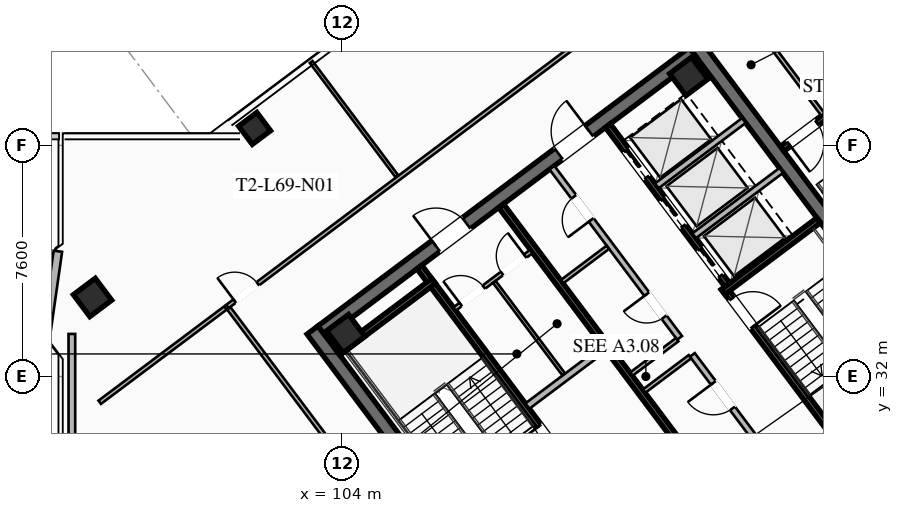
"""IFC4 building model, lengths in metres.
Left out: names, types, materials, properties, quantities, classifications, styles, units other than length and angle.
Written with IfcOpenShell. Run it as: python <this file> out.ifc"""

import sys

from ifc_helpers import new_model, si_unit, direction, frame, frame_2d, origin, origin_2d, place, context, subcontext, project, spatial, rectangle, hollow_rectangle, extrude, element, fill, save


model = new_model("IFC4")
c1 = context("Model", 3, precision=1e-05, world=origin(), true_north=direction((0.0, 1.0)))
c2 = subcontext(c1, "Body", "Model", "MODEL_VIEW")
j1 = project(units=[si_unit("LENGTHUNIT", "METRE"), si_unit("PLANEANGLEUNIT", "RADIAN")], contexts=[c1])
p1 = place(None, origin())
s1 = spatial("IfcSite", under=j1, at=p1, CompositionType="ELEMENT")
p2 = place(p1, origin())
s2 = spatial("IfcBuilding", under=s1, at=p2, CompositionType="ELEMENT")
p3 = place(p2, frame((0.0, 0.0, 255.4)))
s3 = spatial("IfcBuildingStorey", under=s2, at=p3, CompositionType="ELEMENT", Elevation=255.4)
for number, where, z_axis, x_axis in (
    (1, (112.396, 21.047, 0.0), (0.0, 0.0, 1.0), (-0.6, 0.8, 0.0)),
    (2, (115.604, 42.953, 0.0), (0.0, 0.0, 1.0), (0.6, -0.8, 0.0)),
):
    element("IfcWall", number, at=place(p3, frame(where, z_axis=z_axis, x_axis=x_axis)), inside=s3, PredefinedType="SHEAR", context=c2, shape_type="SweptSolid", body=[
        extrude(rectangle(XDim=15.6, YDim=0.45, at=frame_2d((7.8, 0.0))), origin(), (0.0, 0.0, 1.0), 4.0),
    ])
p4 = place(p3, frame((124.649, 30.518, 0.0), z_axis=(0.0, 0.0, 1.0), x_axis=(-0.8, -0.6, 0.0)))
e3 = element("IfcWall", 3, at=p4, inside=s3, PredefinedType="SHEAR", context=c2, shape_type="SweptSolid", body=[
    extrude(rectangle(XDim=15.26, YDim=0.45, at=frame_2d((7.63, 0.0))), origin(), (0.0, 0.0, 1.0), 4.0),
])
p5 = place(p4, frame((9.33, 0.0, 0.0)))
e4 = element("IfcOpeningElement", 4, at=p5, cuts=e3, PredefinedType="OPENING", context=c2, shape_type="SweptSolid", body=[
    extrude(rectangle(XDim=1.25, YDim=2.25, at=frame_2d((0.625, 1.125))), frame((0.0, 0.235, 0.0), z_axis=(0.0, -1.0, 0.0), x_axis=(1.0, 0.0, 0.0)), (0.0, 0.0, 1.0), 0.47),
])
p6 = place(p4, frame((4.28, 0.0, 0.0)))
e5 = element("IfcOpeningElement", 5, at=p6, cuts=e3, PredefinedType="OPENING", context=c2, shape_type="SweptSolid", body=[
    extrude(rectangle(XDim=1.25, YDim=2.25, at=frame_2d((0.625, 1.125))), frame((0.0, 0.235, 0.0), z_axis=(0.0, -1.0, 0.0), x_axis=(1.0, 0.0, 0.0)), (0.0, 0.0, 1.0), 0.47),
])
p7 = place(p3, frame((103.351, 33.482, 0.0), z_axis=(0.0, 0.0, 1.0), x_axis=(0.8, 0.6, 0.0)))
e6 = element("IfcWall", 6, at=p7, inside=s3, PredefinedType="SHEAR", context=c2, shape_type="SweptSolid", body=[
    extrude(rectangle(XDim=15.26, YDim=0.45, at=frame_2d((7.63, 0.0))), origin(), (0.0, 0.0, 1.0), 4.0),
])
p8 = place(p7, frame((4.68, 0.0, 0.0)))
e7 = element("IfcOpeningElement", 7, at=p8, cuts=e6, PredefinedType="OPENING", context=c2, shape_type="SweptSolid", body=[
    extrude(rectangle(XDim=1.25, YDim=2.25, at=frame_2d((0.625, 1.125))), frame((0.0, 0.235, 0.0), z_axis=(0.0, -1.0, 0.0), x_axis=(1.0, 0.0, 0.0)), (0.0, 0.0, 1.0), 0.47),
])
p9 = place(p7, frame((9.73, 0.0, 0.0)))
e8 = element("IfcOpeningElement", 8, at=p9, cuts=e6, PredefinedType="OPENING", context=c2, shape_type="SweptSolid", body=[
    extrude(rectangle(XDim=1.25, YDim=2.25, at=frame_2d((0.625, 1.125))), frame((0.0, 0.235, 0.0), z_axis=(0.0, -1.0, 0.0), x_axis=(1.0, 0.0, 0.0)), (0.0, 0.0, 1.0), 0.47),
])
for number, where, z_axis, x_axis in (
    (9, (115.41, 41.87, 0.0), (0.0, 0.0, 1.0), (0.8, 0.6, 0.0)),
    (10, (104.13, 33.41, 0.0), (0.0, 0.0, 1.0), (0.8, 0.6, 0.0)),
    (11, (95.8, 34.6, 0.0), (0.0, 0.0, 1.0), (0.8, 0.6, 0.0)),
):
    element("IfcColumn", number, at=place(p3, frame(where, z_axis=z_axis, x_axis=x_axis)), inside=s3, PredefinedType="COLUMN", context=c2, shape_type="SweptSolid", body=[
        extrude(hollow_rectangle(XDim=0.9, YDim=0.9, WallThickness=0.04, at=origin_2d()), origin(), (0.0, 0.0, 1.0), 3.78),
    ])
p10 = place(p3, frame((101.13, 40.16, 0.0), z_axis=(0.0, 0.0, 1.0), x_axis=(0.799999996291, 0.600000004945, 0.0)))
e12 = element("IfcColumn", 12, at=p10, inside=s3, PredefinedType="COLUMN", context=c2, shape_type="SweptSolid", body=[
    extrude(hollow_rectangle(XDim=0.75, YDim=0.75, WallThickness=0.032, at=origin_2d()), origin(), (0.0, 0.0, 1.0), 3.78),
])
p11 = place(p3, frame((94.28, 33.46, 0.0), z_axis=(0.0, 0.0, 1.0), x_axis=(0.141370477216, 0.989956760759, 0.0)))
e13 = element("IfcWall", 13, at=p11, inside=s3, PredefinedType="SOLIDWALL", context=c2, shape_type="SweptSolid", body=[
    extrude(rectangle(XDim=2.687, YDim=0.28, at=frame_2d((1.344, 0.0))), origin(), (0.0, 0.0, 1.0), 2.96),
])
p12 = place(p3, frame((95.12, 24.22, 0.0), z_axis=(0.0, 0.0, 1.0), x_axis=(0.0, 1.0, 0.0)))
e14 = element("IfcWall", 14, at=p12, inside=s3, PredefinedType="SOLIDWALL", context=c2, shape_type="SweptSolid", body=[
    extrude(rectangle(XDim=9.18, YDim=0.22, at=frame_2d((4.59, 0.0))), origin(), (0.0, 0.0, 1.0), 2.971),
])
p13 = place(p12, frame((4.2, 0.0, 0.0)))
e15 = element("IfcOpeningElement", 15, at=p13, cuts=e14, PredefinedType="OPENING", context=c2, shape_type="SweptSolid", body=[
    extrude(rectangle(XDim=1.25, YDim=2.25, at=frame_2d((0.625, 1.125))), frame((0.0, 0.12, 0.0), z_axis=(0.0, -1.0, 0.0), x_axis=(1.0, 0.0, 0.0)), (0.0, 0.0, 1.0), 0.24),
])
p14 = place(p3, frame((111.44, 29.08, 0.0), z_axis=(0.0, 0.0, 1.0), x_axis=(-0.59999041401, 0.800007189403, 0.0)))
e16 = element("IfcWall", 16, at=p14, inside=s3, PredefinedType="SHEAR", context=c2, shape_type="SweptSolid", body=[
    extrude(rectangle(XDim=8.15, YDim=0.2, at=frame_2d((4.075, 0.0))), origin(), (0.0, 0.0, 1.0), 3.78),
])
p15 = place(p14, frame((0.45, 0.0, 0.0)))
e17 = element("IfcOpeningElement", 17, at=p15, cuts=e16, PredefinedType="OPENING", context=c2, shape_type="SweptSolid", body=[
    extrude(rectangle(XDim=1.15, YDim=2.2, at=frame_2d((0.575, 1.1))), frame((0.0, 0.11, 0.0), z_axis=(0.0, -1.0, 0.0), x_axis=(1.0, 0.0, 0.0)), (0.0, 0.0, 1.0), 0.22),
])
p16 = place(p3, frame((103.876, 32.782, 0.0), z_axis=(0.0, 0.0, 1.0), x_axis=(0.800014909178, 0.599980120581, 0.0)))
e18 = element("IfcWall", 18, at=p16, inside=s3, PredefinedType="SHEAR", context=c2, shape_type="SweptSolid", body=[
    extrude(rectangle(XDim=3.93, YDim=0.2, at=frame_2d((1.965, 0.0))), origin(), (0.0, 0.0, 1.0), 3.78),
])
p17 = place(p3, frame((116.56, 34.92, 0.0), z_axis=(0.0, 0.0, 1.0), x_axis=(0.59999041401, -0.800007189403, 0.0)))
e19 = element("IfcWall", 19, at=p17, inside=s3, PredefinedType="SHEAR", context=c2, shape_type="SweptSolid", body=[
    extrude(rectangle(XDim=8.15, YDim=0.2, at=frame_2d((4.075, 0.0))), origin(), (0.0, 0.0, 1.0), 3.78),
])
p18 = place(p17, frame((0.45, 0.0, 0.0)))
e20 = element("IfcOpeningElement", 20, at=p18, cuts=e19, PredefinedType="OPENING", context=c2, shape_type="SweptSolid", body=[
    extrude(rectangle(XDim=1.15, YDim=2.2, at=frame_2d((0.575, 1.1))), frame((0.0, 0.11, 0.0), z_axis=(0.0, -1.0, 0.0), x_axis=(1.0, 0.0, 0.0)), (0.0, 0.0, 1.0), 0.22),
])
p19 = place(p3, frame((116.54, 34.78, 0.0), z_axis=(0.0, 0.0, 1.0), x_axis=(0.800014909178, 0.599980120581, 0.0)))
e21 = element("IfcWall", 21, at=p19, inside=s3, PredefinedType="SHEAR", context=c2, shape_type="SweptSolid", body=[
    extrude(rectangle(XDim=3.93, YDim=0.2, at=frame_2d((1.965, 0.0))), origin(), (0.0, 0.0, 1.0), 3.78),
])
p20 = place(p3, frame((118.058, 25.856, 0.0), z_axis=(0.0, 0.0, 1.0), x_axis=(-0.600002657301, 0.799998007018, 0.0)))
e22 = element("IfcWall", 22, at=p20, inside=s3, PredefinedType="SHEAR", context=c2, shape_type="SweptSolid", body=[
    extrude(rectangle(XDim=14.7, YDim=0.2, at=frame_2d((7.35, 0.0))), origin(), (0.0, 0.0, 1.0), 3.78),
])
p21 = place(p3, frame((110.104, 31.028, 0.0), z_axis=(0.0, 0.0, 1.0), x_axis=(0.800018601094, 0.59997519774, 0.0)))
e23 = element("IfcWall", 23, at=p21, inside=s3, PredefinedType="SOLIDWALL", context=c2, shape_type="SweptSolid", body=[
    extrude(rectangle(XDim=3.15, YDim=0.22, at=frame_2d((1.575, 0.0))), origin(), (0.0, 0.0, 1.0), 2.971),
])
p22 = place(p3, frame((112.75, 40.25, 0.0), z_axis=(0.0, 0.0, 1.0), x_axis=(0.599994036198, -0.800004472816, 0.0)))
e24 = element("IfcWall", 24, at=p22, inside=s3, PredefinedType="SHEAR", context=c2, shape_type="SweptSolid", body=[
    extrude(rectangle(XDim=6.55, YDim=0.2, at=frame_2d((3.275, 0.0))), origin(), (0.0, 0.0, 1.0), 3.78),
])
p23 = place(p22, frame((5.075, 0.0, 0.0)))
e25 = element("IfcOpeningElement", 25, at=p23, cuts=e24, PredefinedType="OPENING", context=c2, shape_type="SweptSolid", body=[
    extrude(rectangle(XDim=1.1, YDim=2.2, at=frame_2d((0.55, 1.1))), frame((0.0, 0.11, 0.0), z_axis=(0.0, -1.0, 0.0), x_axis=(1.0, 0.0, 0.0)), (0.0, 0.0, 1.0), 0.22),
])
p24 = place(p22, frame((3.025, 0.0, 0.0)))
e26 = element("IfcOpeningElement", 26, at=p24, cuts=e24, PredefinedType="OPENING", context=c2, shape_type="SweptSolid", body=[
    extrude(rectangle(XDim=1.1, YDim=2.2, at=frame_2d((0.55, 1.1))), frame((0.0, 0.11, 0.0), z_axis=(0.0, -1.0, 0.0), x_axis=(1.0, 0.0, 0.0)), (0.0, 0.0, 1.0), 0.22),
])
p25 = place(p22, frame((1.025, 0.0, 0.0)))
e27 = element("IfcOpeningElement", 27, at=p25, cuts=e24, PredefinedType="OPENING", context=c2, shape_type="SweptSolid", body=[
    extrude(rectangle(XDim=1.1, YDim=2.2, at=frame_2d((0.55, 1.1))), frame((0.0, 0.11, 0.0), z_axis=(0.0, -1.0, 0.0), x_axis=(1.0, 0.0, 0.0)), (0.0, 0.0, 1.0), 0.22),
])
for number, where, z_axis, x_axis in (
    (28, (115.59, 36.63, 0.0), (0.0, 0.0, 1.0), (0.8, 0.6, 0.0)),
    (29, (114.36, 38.27, 0.0), (0.0, 0.0, 1.0), (0.8, 0.6, 0.0)),
):
    element("IfcWall", number, at=place(p3, frame(where, z_axis=z_axis, x_axis=x_axis)), inside=s3, PredefinedType="SOLIDWALL", context=c2, shape_type="SweptSolid", body=[
        extrude(rectangle(XDim=3.58, YDim=0.2, at=frame_2d((1.79, 0.0))), origin(), (0.0, 0.0, 1.0), 3.78),
    ])
p26 = place(p3, frame((107.71, 34.22, 0.0), z_axis=(0.0, 0.0, 1.0), x_axis=(0.799981399002, 0.60002480053, 0.0)))
e30 = element("IfcWall", 30, at=p26, inside=s3, PredefinedType="PARTITIONING", context=c2, shape_type="SweptSolid", body=[
    extrude(rectangle(XDim=3.15, YDim=0.135, at=frame_2d((1.575, 0.0))), origin(), (0.0, 0.0, 1.0), 2.971),
])
p27 = place(p26, frame((0.25, 0.0, 0.0)))
e31 = element("IfcOpeningElement", 31, at=p27, cuts=e30, PredefinedType="OPENING", context=c2, shape_type="SweptSolid", body=[
    extrude(rectangle(XDim=0.95, YDim=2.05, at=frame_2d((0.475, 1.025))), frame((0.0, 0.077, 0.0), z_axis=(0.0, -1.0, 0.0), x_axis=(1.0, 0.0, 0.0)), (0.0, 0.0, 1.0), 0.155),
])
p28 = place(p26, frame((1.95, 0.0, 0.0)))
e32 = element("IfcOpeningElement", 32, at=p28, cuts=e30, PredefinedType="OPENING", context=c2, shape_type="SweptSolid", body=[
    extrude(rectangle(XDim=0.95, YDim=2.05, at=frame_2d((0.475, 1.025))), frame((0.0, 0.077, 0.0), z_axis=(0.0, -1.0, 0.0), x_axis=(1.0, 0.0, 0.0)), (0.0, 0.0, 1.0), 0.155),
])
p29 = place(p3, frame((111.296, 32.072, 0.0), z_axis=(0.0, 0.0, 1.0), x_axis=(-0.59995887973, 0.800030838552, 0.0)))
e33 = element("IfcWall", 33, at=p29, inside=s3, PredefinedType="PARTITIONING", context=c2, shape_type="SweptSolid", body=[
    extrude(rectangle(XDim=3.8, YDim=0.11, at=frame_2d((1.9, 0.0))), origin(), (0.0, 0.0, 1.0), 2.971),
])
p30 = place(p3, frame((119.73, 27.11, 0.0), z_axis=(0.0, 0.0, 1.0), x_axis=(-0.600005580459, 0.799995814625, 0.0)))
e34 = element("IfcWall", 34, at=p30, inside=s3, PredefinedType="SOLIDWALL", context=c2, shape_type="SweptSolid", body=[
    extrude(rectangle(XDim=7.0, YDim=0.2, at=frame_2d((3.5, 0.0))), origin(), (0.0, 0.0, 1.0), 2.971),
])
p31 = place(p30, frame((0.85, 0.0, 0.0)))
e35 = element("IfcOpeningElement", 35, at=p31, cuts=e34, PredefinedType="OPENING", context=c2, shape_type="SweptSolid", body=[
    extrude(rectangle(XDim=0.95, YDim=2.05, at=frame_2d((0.475, 1.025))), frame((0.0, 0.11, 0.0), z_axis=(0.0, -1.0, 0.0), x_axis=(1.0, 0.0, 0.0)), (0.0, 0.0, 1.0), 0.22),
])
p32 = place(p30, frame((4.8, 0.0, 0.0)))
e36 = element("IfcOpeningElement", 36, at=p32, cuts=e34, PredefinedType="OPENING", context=c2, shape_type="SweptSolid", body=[
    extrude(rectangle(XDim=1.05, YDim=2.2, at=frame_2d((0.525, 1.1))), frame((0.0, 0.11, 0.0), z_axis=(0.0, -1.0, 0.0), x_axis=(1.0, 0.0, 0.0)), (0.0, 0.0, 1.0), 0.22),
])
p33 = place(p3, frame((113.946, 31.522, 0.0), z_axis=(0.0, 0.0, 1.0), x_axis=(0.8, 0.6, 0.0)))
e37 = element("IfcWall", 37, at=p33, inside=s3, PredefinedType="PARTITIONING", context=c2, shape_type="SweptSolid", body=[
    extrude(rectangle(XDim=1.88, YDim=0.135, at=frame_2d((0.94, 0.0))), origin(), (0.0, 0.0, 1.0), 2.971),
])
p34 = place(p3, frame((115.11, 33.27, 0.0), z_axis=(0.0, 0.0, 1.0), x_axis=(-0.600011160345, 0.79999162962, 0.0)))
e38 = element("IfcWall", 38, at=p34, inside=s3, PredefinedType="SOLIDWALL", context=c2, shape_type="SweptSolid", body=[
    extrude(rectangle(XDim=7.0, YDim=0.2, at=frame_2d((3.5, 0.0))), origin(), (0.0, 0.0, 1.0), 2.971),
])
p35 = place(p34, frame((0.85, 0.0, 0.0)))
e39 = element("IfcOpeningElement", 39, at=p35, cuts=e38, PredefinedType="OPENING", context=c2, shape_type="SweptSolid", body=[
    extrude(rectangle(XDim=0.95, YDim=2.05, at=frame_2d((0.475, 1.025))), frame((0.0, 0.11, 0.0), z_axis=(0.0, -1.0, 0.0), x_axis=(1.0, 0.0, 0.0)), (0.0, 0.0, 1.0), 0.22),
])
p36 = place(p34, frame((4.85, 0.0, 0.0)))
e40 = element("IfcOpeningElement", 40, at=p36, cuts=e38, PredefinedType="OPENING", context=c2, shape_type="SweptSolid", body=[
    extrude(rectangle(XDim=0.95, YDim=2.05, at=frame_2d((0.475, 1.025))), frame((0.0, 0.11, 0.0), z_axis=(0.0, -1.0, 0.0), x_axis=(1.0, 0.0, 0.0)), (0.0, 0.0, 1.0), 0.22),
])
p37 = place(p3, frame((113.526, 32.082, 0.0), z_axis=(0.0, 0.0, 1.0), x_axis=(0.800046745961, 0.599937666993, 0.0)))
e41 = element("IfcWall", 41, at=p37, inside=s3, PredefinedType="PARTITIONING", context=c2, shape_type="SweptSolid", body=[
    extrude(rectangle(XDim=1.88, YDim=0.135, at=frame_2d((0.94, 0.0))), origin(), (0.0, 0.0, 1.0), 2.971),
])
p38 = place(p3, frame((111.246, 35.122, 0.0), z_axis=(0.0, 0.0, 1.0), x_axis=(0.8, 0.6, 0.0)))
e42 = element("IfcWall", 42, at=p38, inside=s3, PredefinedType="PARTITIONING", context=c2, shape_type="SweptSolid", body=[
    extrude(rectangle(XDim=1.88, YDim=0.135, at=frame_2d((0.94, 0.0))), origin(), (0.0, 0.0, 1.0), 2.971),
])
p39 = place(p3, frame((121.204, 41.528, 0.0), z_axis=(0.0, 0.0, 1.0), x_axis=(-0.800017232136, -0.599977023131, 0.0)))
e43 = element("IfcWall", 43, at=p39, inside=s3, PredefinedType="SHEAR", context=c2, shape_type="SweptSolid", body=[
    extrude(rectangle(XDim=3.4, YDim=0.2, at=frame_2d((1.7, 0.0))), origin(), (0.0, 0.0, 1.0), 3.78),
])
p40 = place(p39, frame((1.975, 0.0, 0.0)))
e44 = element("IfcOpeningElement", 44, at=p40, cuts=e43, PredefinedType="OPENING", context=c2, shape_type="SweptSolid", body=[
    extrude(rectangle(XDim=1.15, YDim=2.2, at=frame_2d((0.575, 1.1))), frame((0.0, 0.11, 0.0), z_axis=(0.0, -1.0, 0.0), x_axis=(1.0, 0.0, 0.0)), (0.0, 0.0, 1.0), 0.22),
])
p41 = place(p3, frame((119.824, 40.618, 0.0), z_axis=(0.0, 0.0, 1.0), x_axis=(-0.599982243973, 0.800013316712, 0.0)))
e45 = element("IfcWall", 45, at=p41, inside=s3, PredefinedType="PARTITIONING", context=c2, shape_type="SweptSolid", body=[
    extrude(rectangle(XDim=4.4, YDim=0.135, at=frame_2d((2.2, 0.0))), origin(), (0.0, 0.0, 1.0), 2.971),
])
p42 = place(p3, frame((100.236, 34.302, 0.0), z_axis=(0.0, 0.0, 1.0), x_axis=(0.799997393501, 0.600003475316, 0.0)))
e46 = element("IfcWall", 46, at=p42, inside=s3, PredefinedType="PARTITIONING", context=c2, shape_type="SweptSolid", body=[
    extrude(rectangle(XDim=22.48, YDim=0.135, at=frame_2d((11.24, 0.0))), origin(), (0.0, 0.0, 1.0), 2.971),
])
p43 = place(p42, frame((0.3, 0.0, 0.0)))
e47 = element("IfcOpeningElement", 47, at=p43, cuts=e46, PredefinedType="OPENING", context=c2, shape_type="SweptSolid", body=[
    extrude(rectangle(XDim=0.95, YDim=2.05, at=frame_2d((0.475, 1.025))), frame((0.0, 0.077, 0.0), z_axis=(0.0, -1.0, 0.0), x_axis=(1.0, 0.0, 0.0)), (0.0, 0.0, 1.0), 0.155),
])
p44 = place(p42, frame((21.23, 0.0, 0.0)))
e48 = element("IfcOpeningElement", 48, at=p44, cuts=e46, PredefinedType="OPENING", context=c2, shape_type="SweptSolid", body=[
    extrude(rectangle(XDim=0.95, YDim=2.05, at=frame_2d((0.475, 1.025))), frame((0.0, 0.077, 0.0), z_axis=(0.0, -1.0, 0.0), x_axis=(1.0, 0.0, 0.0)), (0.0, 0.0, 1.0), 0.155),
])
p45 = place(p3, frame((105.812, 38.584, 0.0), z_axis=(0.0, 0.0, 1.0), x_axis=(-0.600008311051, 0.799993766644, 0.0)))
e49 = element("IfcWall", 49, at=p45, inside=s3, PredefinedType="PARTITIONING", context=c2, shape_type="SweptSolid", body=[
    extrude(rectangle(XDim=4.7, YDim=0.11, at=frame_2d((2.35, 0.0))), origin(), (0.0, 0.0, 1.0), 2.971),
])
p46 = place(p3, frame((111.99, 18.63, 0.0), z_axis=(0.0, 0.0, 1.0), x_axis=(-0.599997997836, 0.800001501619, 0.0)))
e50 = element("IfcWall", 50, at=p46, inside=s3, PredefinedType="PARTITIONING", context=c2, shape_type="SweptSolid", body=[
    extrude(rectangle(XDim=19.51, YDim=0.135, at=frame_2d((9.755, 0.0))), origin(), (0.0, 0.0, 1.0), 2.971),
])
p47 = place(p46, frame((0.3, 0.0, 0.0)))
e51 = element("IfcOpeningElement", 51, at=p47, cuts=e50, PredefinedType="OPENING", context=c2, shape_type="SweptSolid", body=[
    extrude(rectangle(XDim=0.95, YDim=2.05, at=frame_2d((0.475, 1.025))), frame((0.0, 0.077, 0.0), z_axis=(0.0, -1.0, 0.0), x_axis=(1.0, 0.0, 0.0)), (0.0, 0.0, 1.0), 0.155),
])
p48 = place(p46, frame((9.232, 0.0, 0.0)))
e52 = element("IfcOpeningElement", 52, at=p48, cuts=e50, PredefinedType="OPENING", context=c2, shape_type="SweptSolid", body=[
    extrude(rectangle(XDim=0.95, YDim=2.05, at=frame_2d((0.475, 1.025))), frame((0.0, 0.077, 0.0), z_axis=(0.0, -1.0, 0.0), x_axis=(1.0, 0.0, 0.0)), (0.0, 0.0, 1.0), 0.155),
])
p49 = place(p3, frame((100.172, 34.254, 0.0), z_axis=(0.0, 0.0, 1.0), x_axis=(-0.800033998508, -0.59995466598, 0.0)))
e53 = element("IfcWall", 53, at=p49, inside=s3, PredefinedType="PARTITIONING", context=c2, shape_type="SweptSolid", body=[
    extrude(rectangle(XDim=5.17, YDim=0.135, at=frame_2d((2.585, 0.0))), origin(), (0.0, 0.0, 1.0), 2.971),
])
p50 = place(p8, origin())
e54 = element("IfcDoor", 54, at=p50, inside=s3, OperationType="SINGLE_SWING_LEFT", PredefinedType="DOOR", context=c2, shape_type="SweptSolid", body=[
    extrude(rectangle(XDim=1.25, YDim=2.25, at=frame_2d((0.625, 1.125))), frame((0.0, 0.025, 0.0), z_axis=(0.0, -1.0, 0.0), x_axis=(1.0, 0.0, 0.0)), (0.0, 0.0, 1.0), 0.05),
])
fill(e7, e54)
p51 = place(p9, origin())
e55 = element("IfcDoor", 55, at=p51, inside=s3, OperationType="SINGLE_SWING_RIGHT", PredefinedType="DOOR", context=c2, shape_type="SweptSolid", body=[
    extrude(rectangle(XDim=1.25, YDim=2.25, at=frame_2d((0.625, 1.125))), frame((0.0, 0.025, 0.0), z_axis=(0.0, -1.0, 0.0), x_axis=(1.0, 0.0, 0.0)), (0.0, 0.0, 1.0), 0.05),
])
fill(e8, e55)
p52 = place(p15, origin())
e56 = element("IfcDoor", 56, at=p52, inside=s3, OperationType="SINGLE_SWING_RIGHT", PredefinedType="DOOR", context=c2, shape_type="SweptSolid", body=[
    extrude(rectangle(XDim=1.15, YDim=2.2, at=frame_2d((0.575, 1.1))), frame((0.0, 0.025, 0.0), z_axis=(0.0, -1.0, 0.0), x_axis=(1.0, 0.0, 0.0)), (0.0, 0.0, 1.0), 0.05),
])
fill(e17, e56)
p53 = place(p18, origin())
e57 = element("IfcDoor", 57, at=p53, inside=s3, OperationType="SINGLE_SWING_RIGHT", PredefinedType="DOOR", context=c2, shape_type="SweptSolid", body=[
    extrude(rectangle(XDim=1.15, YDim=2.2, at=frame_2d((0.575, 1.1))), frame((0.0, 0.025, 0.0), z_axis=(0.0, -1.0, 0.0), x_axis=(1.0, 0.0, 0.0)), (0.0, 0.0, 1.0), 0.05),
])
fill(e20, e57)
p54 = place(p27, origin())
e58 = element("IfcDoor", 58, at=p54, inside=s3, OperationType="SINGLE_SWING_LEFT", PredefinedType="DOOR", context=c2, shape_type="SweptSolid", body=[
    extrude(rectangle(XDim=0.95, YDim=2.05, at=frame_2d((0.475, 1.025))), frame((0.0, 0.025, 0.0), z_axis=(0.0, -1.0, 0.0), x_axis=(1.0, 0.0, 0.0)), (0.0, 0.0, 1.0), 0.05),
])
fill(e31, e58)
p55 = place(p28, origin())
e59 = element("IfcDoor", 59, at=p55, inside=s3, OperationType="SINGLE_SWING_RIGHT", PredefinedType="DOOR", context=c2, shape_type="SweptSolid", body=[
    extrude(rectangle(XDim=0.95, YDim=2.05, at=frame_2d((0.475, 1.025))), frame((0.0, 0.025, 0.0), z_axis=(0.0, -1.0, 0.0), x_axis=(1.0, 0.0, 0.0)), (0.0, 0.0, 1.0), 0.05),
])
fill(e32, e59)
p56 = place(p32, origin())
e60 = element("IfcDoor", 60, at=p56, inside=s3, OperationType="SINGLE_SWING_RIGHT", PredefinedType="DOOR", context=c2, shape_type="SweptSolid", body=[
    extrude(rectangle(XDim=1.05, YDim=2.2, at=frame_2d((0.525, 1.1))), frame((0.0, 0.025, 0.0), z_axis=(0.0, -1.0, 0.0), x_axis=(1.0, 0.0, 0.0)), (0.0, 0.0, 1.0), 0.05),
])
fill(e36, e60)
p57 = place(p35, origin())
e61 = element("IfcDoor", 61, at=p57, inside=s3, OperationType="SINGLE_SWING_RIGHT", PredefinedType="DOOR", context=c2, shape_type="SweptSolid", body=[
    extrude(rectangle(XDim=0.95, YDim=2.05, at=frame_2d((0.475, 1.025))), frame((0.0, 0.025, 0.0), z_axis=(0.0, -1.0, 0.0), x_axis=(1.0, 0.0, 0.0)), (0.0, 0.0, 1.0), 0.05),
])
fill(e39, e61)
p58 = place(p36, origin())
e62 = element("IfcDoor", 62, at=p58, inside=s3, OperationType="SINGLE_SWING_LEFT", PredefinedType="DOOR", context=c2, shape_type="SweptSolid", body=[
    extrude(rectangle(XDim=0.95, YDim=2.05, at=frame_2d((0.475, 1.025))), frame((0.0, 0.025, 0.0), z_axis=(0.0, -1.0, 0.0), x_axis=(1.0, 0.0, 0.0)), (0.0, 0.0, 1.0), 0.05),
])
fill(e40, e62)
p59 = place(p40, origin())
e63 = element("IfcDoor", 63, at=p59, inside=s3, OperationType="SINGLE_SWING_RIGHT", PredefinedType="DOOR", context=c2, shape_type="SweptSolid", body=[
    extrude(rectangle(XDim=1.15, YDim=2.2, at=frame_2d((0.575, 1.1))), frame((0.0, 0.025, 0.0), z_axis=(0.0, -1.0, 0.0), x_axis=(1.0, 0.0, 0.0)), (0.0, 0.0, 1.0), 0.05),
])
fill(e44, e63)
p60 = place(p43, origin())
e64 = element("IfcDoor", 64, at=p60, inside=s3, OperationType="SINGLE_SWING_LEFT", PredefinedType="DOOR", context=c2, shape_type="SweptSolid", body=[
    extrude(rectangle(XDim=0.95, YDim=2.05, at=frame_2d((0.475, 1.025))), frame((0.0, 0.025, 0.0), z_axis=(0.0, -1.0, 0.0), x_axis=(1.0, 0.0, 0.0)), (0.0, 0.0, 1.0), 0.05),
])
fill(e47, e64)
p61 = place(p23, origin())
e65 = element("IfcDoor", 65, at=p61, inside=s3, OperationType="SLIDING_TO_LEFT", PredefinedType="DOOR", context=c2, shape_type="SweptSolid", body=[
    extrude(rectangle(XDim=1.1, YDim=2.2, at=frame_2d((0.55, 1.1))), frame((0.0, 0.025, 0.0), z_axis=(0.0, -1.0, 0.0), x_axis=(1.0, 0.0, 0.0)), (0.0, 0.0, 1.0), 0.05),
])
fill(e25, e65)
p62 = place(p24, origin())
e66 = element("IfcDoor", 66, at=p62, inside=s3, OperationType="SLIDING_TO_LEFT", PredefinedType="DOOR", context=c2, shape_type="SweptSolid", body=[
    extrude(rectangle(XDim=1.1, YDim=2.2, at=frame_2d((0.55, 1.1))), frame((0.0, 0.025, 0.0), z_axis=(0.0, -1.0, 0.0), x_axis=(1.0, 0.0, 0.0)), (0.0, 0.0, 1.0), 0.05),
])
fill(e26, e66)
p63 = place(p25, origin())
e67 = element("IfcDoor", 67, at=p63, inside=s3, OperationType="SLIDING_TO_LEFT", PredefinedType="DOOR", context=c2, shape_type="SweptSolid", body=[
    extrude(rectangle(XDim=1.1, YDim=2.2, at=frame_2d((0.55, 1.1))), frame((0.0, 0.025, 0.0), z_axis=(0.0, -1.0, 0.0), x_axis=(1.0, 0.0, 0.0)), (0.0, 0.0, 1.0), 0.05),
])
fill(e27, e67)
save(model, sys.argv[1])
